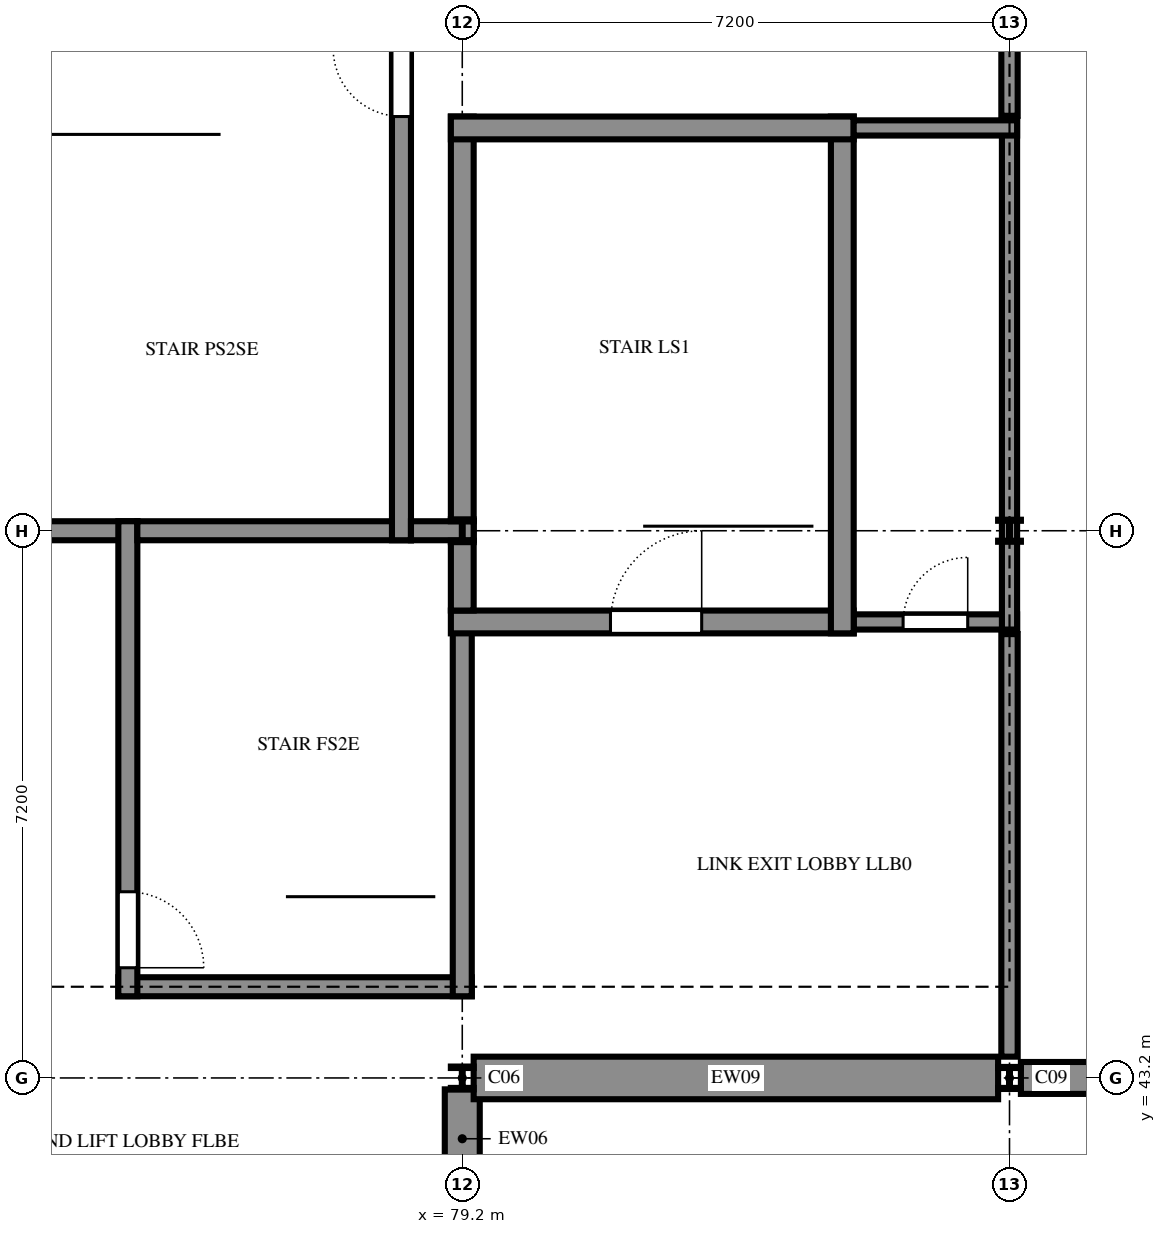
"""IFC4 building model, lengths in metres.
Left out: names, types, materials, properties, quantities, classifications, styles, units other than length and angle.
Written with IfcOpenShell. Run it as: python <this file> out.ifc"""

import sys

from ifc_helpers import new_model, si_unit, direction, frame, frame_2d, origin, origin_2d, place, context, subcontext, project, spatial, rectangle, i_section, extrude, element, fill, save


model = new_model("IFC4")
c1 = context("Model", 3, precision=1e-05, world=origin(), true_north=direction((0.0, 1.0)))
c2 = subcontext(c1, "Body", "Model", "MODEL_VIEW")
j1 = project(units=[si_unit("LENGTHUNIT", "METRE"), si_unit("PLANEANGLEUNIT", "RADIAN")], contexts=[c1])
p1 = place(None, origin())
s1 = spatial("IfcSite", under=j1, at=p1, CompositionType="ELEMENT")
p2 = place(p1, origin())
s2 = spatial("IfcBuilding", under=s1, at=p2, CompositionType="ELEMENT")
p3 = place(p2, frame((0.0, 0.0, 14.4)))
s3 = spatial("IfcBuildingStorey", under=s2, at=p3, CompositionType="ELEMENT", Elevation=14.4)
for number, where, z_axis, x_axis in (
    (1, (79.2, 43.2, 0.0), (0.0, 0.0, 1.0), (1.0, 0.0, 0.0)),
    (2, (79.2, 50.4, 0.0), (0.0, 0.0, 1.0), (1.0, 0.0, 0.0)),
):
    element("IfcColumn", number, at=place(p3, frame(where, z_axis=z_axis, x_axis=x_axis)), inside=s3, PredefinedType="COLUMN", context=c2, shape_type="SweptSolid", body=[
        extrude(i_section(OverallWidth=0.3, OverallDepth=0.3, WebThickness=0.011, FlangeThickness=0.019, FilletRadius=0.027, at=origin_2d()), origin(), (0.0, 0.0, 1.0), 3.6),
    ])
for number, where, z_axis, x_axis in (
    (3, (86.4, 43.2, 0.0), (0.0, 0.0, 1.0), (1.0, 0.0, 0.0)),
    (4, (86.4, 50.4, 0.0), (0.0, 0.0, 1.0), (1.0, 0.0, 0.0)),
):
    element("IfcColumn", number, at=place(p3, frame(where, z_axis=z_axis, x_axis=x_axis)), inside=s3, PredefinedType="COLUMN", context=c2, shape_type="SweptSolid", body=[
        extrude(i_section(OverallWidth=0.3, OverallDepth=0.29, WebThickness=0.009, FlangeThickness=0.014, FilletRadius=0.027, at=origin_2d()), origin(), (0.0, 0.0, 1.0), 3.6),
    ])
p4 = place(p3, frame((74.675, 44.4, 0.0), z_axis=(0.0, 0.0, 1.0), x_axis=(1.0, 0.0, 0.0)))
e5 = element("IfcWall", 5, at=p4, inside=s3, PredefinedType="SHEAR", context=c2, shape_type="SweptSolid", body=[
    extrude(rectangle(XDim=4.65, YDim=0.25, at=frame_2d((2.325, 0.0))), origin(), (0.0, 0.0, 1.0), 3.6),
])
p5 = place(p3, frame((79.2, 44.275, 0.0), z_axis=(0.0, 0.0, 1.0), x_axis=(0.0, 1.0, 0.0)))
e6 = element("IfcWall", 6, at=p5, inside=s3, PredefinedType="SHEAR", context=c2, shape_type="SweptSolid", body=[
    extrude(rectangle(XDim=5.075, YDim=0.25, at=frame_2d((2.538, 0.0))), origin(), (0.0, 0.0, 1.0), 3.6),
])
p6 = place(p3, frame((79.05, 49.2, 0.0), z_axis=(0.0, 0.0, 1.0), x_axis=(1.0, 0.0, 0.0)))
e7 = element("IfcWall", 7, at=p6, inside=s3, PredefinedType="SHEAR", context=c2, shape_type="SweptSolid", body=[
    extrude(rectangle(XDim=5.3, YDim=0.3, at=frame_2d((2.65, 0.0))), origin(), (0.0, 0.0, 1.0), 3.6),
])
p7 = place(p6, frame((2.1, 0.0, 0.0)))
e8 = element("IfcOpeningElement", 8, at=p7, cuts=e7, PredefinedType="OPENING", context=c2, shape_type="SweptSolid", body=[
    extrude(rectangle(XDim=1.2, YDim=2.4, at=frame_2d((0.6, 1.2))), frame((0.0, 0.16, 0.0), z_axis=(0.0, -1.0, 0.0), x_axis=(1.0, 0.0, 0.0)), (0.0, 0.0, 1.0), 0.32),
])
p8 = place(p3, frame((79.2, 49.35, 0.0), z_axis=(0.0, 0.0, 1.0), x_axis=(0.0, 1.0, 0.0)))
e9 = element("IfcWall", 9, at=p8, inside=s3, PredefinedType="SHEAR", context=c2, shape_type="SweptSolid", body=[
    extrude(rectangle(XDim=1.175, YDim=0.3, at=frame_2d((0.587, 0.0))), origin(), (0.0, 0.0, 1.0), 3.6),
])
p9 = place(p3, frame((84.35, 49.2, 0.0), z_axis=(0.0, 0.0, 1.0), x_axis=(1.0, 0.0, 0.0)))
e10 = element("IfcWall", 10, at=p9, inside=s3, PredefinedType="SHEAR", context=c2, shape_type="SweptSolid", body=[
    extrude(rectangle(XDim=2.15, YDim=0.2, at=frame_2d((1.075, 0.0))), origin(), (0.0, 0.0, 1.0), 3.6),
])
p10 = place(p9, frame((0.65, 0.0, 0.0)))
e11 = element("IfcOpeningElement", 11, at=p10, cuts=e10, PredefinedType="OPENING", context=c2, shape_type="SweptSolid", body=[
    extrude(rectangle(XDim=0.85, YDim=2.1, at=frame_2d((0.425, 1.05))), frame((0.0, 0.11, 0.0), z_axis=(0.0, -1.0, 0.0), x_axis=(1.0, 0.0, 0.0)), (0.0, 0.0, 1.0), 0.22),
])
p11 = place(p3, frame((84.2, 49.05, 0.0), z_axis=(0.0, 0.0, 1.0), x_axis=(0.0, 1.0, 0.0)))
e12 = element("IfcWall", 12, at=p11, inside=s3, PredefinedType="SHEAR", context=c2, shape_type="SweptSolid", body=[
    extrude(rectangle(XDim=6.8, YDim=0.3, at=frame_2d((3.4, 0.0))), origin(), (0.0, 0.0, 1.0), 3.6),
])
p12 = place(p3, frame((86.4, 49.1, 0.0), z_axis=(0.0, 0.0, 1.0), x_axis=(0.0, 1.0, 0.0)))
e13 = element("IfcWall", 13, at=p12, inside=s3, PredefinedType="SHEAR", context=c2, shape_type="SweptSolid", body=[
    extrude(rectangle(XDim=6.7, YDim=0.2, at=frame_2d((3.35, 0.0))), origin(), (0.0, 0.0, 1.0), 3.6),
])
p13 = place(p3, frame((73.525, 50.4, 0.0), z_axis=(0.0, 0.0, 1.0), x_axis=(1.0, 0.0, 0.0)))
e14 = element("IfcWall", 14, at=p13, inside=s3, PredefinedType="SHEAR", context=c2, shape_type="SweptSolid", body=[
    extrude(rectangle(XDim=1.4, YDim=0.25, at=frame_2d((0.7, 0.0))), origin(), (0.0, 0.0, 1.0), 3.6),
])
p14 = place(p3, frame((74.8, 50.525, 0.0), z_axis=(0.0, 0.0, 1.0), x_axis=(0.0, -1.0, 0.0)))
e15 = element("IfcWall", 15, at=p14, inside=s3, PredefinedType="SHEAR", context=c2, shape_type="SweptSolid", body=[
    extrude(rectangle(XDim=6.25, YDim=0.25, at=frame_2d((3.125, 0.0))), origin(), (0.0, 0.0, 1.0), 3.6),
])
p15 = place(p14, frame((4.875, 0.0, 0.0)))
e16 = element("IfcOpeningElement", 16, at=p15, cuts=e15, PredefinedType="OPENING", context=c2, shape_type="SweptSolid", body=[
    extrude(rectangle(XDim=1.0, YDim=2.4, at=frame_2d((0.5, 1.2))), frame((0.0, 0.135, 0.0), z_axis=(0.0, -1.0, 0.0), x_axis=(1.0, 0.0, 0.0)), (0.0, 0.0, 1.0), 0.27),
])
p16 = place(p3, frame((78.525, 50.4, 0.0), z_axis=(0.0, 0.0, 1.0), x_axis=(-1.0, 0.0, 0.0)))
e17 = element("IfcWall", 17, at=p16, inside=s3, PredefinedType="SHEAR", context=c2, shape_type="SweptSolid", body=[
    extrude(rectangle(XDim=3.6, YDim=0.25, at=frame_2d((1.8, 0.0))), origin(), (0.0, 0.0, 1.0), 3.6),
])
p17 = place(p3, frame((78.4, 50.275, 0.0), z_axis=(0.0, 0.0, 1.0), x_axis=(0.0, 1.0, 0.0)))
e18 = element("IfcWall", 18, at=p17, inside=s3, PredefinedType="SHEAR", context=c2, shape_type="SweptSolid", body=[
    extrude(rectangle(XDim=6.75, YDim=0.25, at=frame_2d((3.375, 0.0))), origin(), (0.0, 0.0, 1.0), 3.6),
])
p18 = place(p17, frame((5.575, 0.0, 0.0)))
e19 = element("IfcOpeningElement", 19, at=p18, cuts=e18, PredefinedType="OPENING", context=c2, shape_type="SweptSolid", body=[
    extrude(rectangle(XDim=0.9, YDim=2.1, at=frame_2d((0.45, 1.05))), frame((0.0, 0.135, 0.0), z_axis=(0.0, -1.0, 0.0), x_axis=(1.0, 0.0, 0.0)), (0.0, 0.0, 1.0), 0.27),
])
p19 = place(p3, frame((79.35, 50.4, 0.0), z_axis=(0.0, 0.0, 1.0), x_axis=(-1.0, 0.0, 0.0)))
e20 = element("IfcWall", 20, at=p19, inside=s3, PredefinedType="SHEAR", context=c2, shape_type="SweptSolid", body=[
    extrude(rectangle(XDim=0.825, YDim=0.25, at=frame_2d((0.413, 0.0))), origin(), (0.0, 0.0, 1.0), 3.6),
])
p20 = place(p3, frame((79.2, 55.85, 0.0), z_axis=(0.0, 0.0, 1.0), x_axis=(0.0, -1.0, 0.0)))
e21 = element("IfcWall", 21, at=p20, inside=s3, PredefinedType="SHEAR", context=c2, shape_type="SweptSolid", body=[
    extrude(rectangle(XDim=5.325, YDim=0.3, at=frame_2d((2.663, 0.0))), origin(), (0.0, 0.0, 1.0), 3.6),
])
p21 = place(p3, frame((84.35, 55.7, 0.0), z_axis=(0.0, 0.0, 1.0), x_axis=(-1.0, 0.0, 0.0)))
e22 = element("IfcWall", 22, at=p21, inside=s3, PredefinedType="SHEAR", context=c2, shape_type="SweptSolid", body=[
    extrude(rectangle(XDim=5.3, YDim=0.3, at=frame_2d((2.65, 0.0))), origin(), (0.0, 0.0, 1.0), 3.6),
])
p22 = place(p3, frame((86.5, 55.7, 0.0), z_axis=(0.0, 0.0, 1.0), x_axis=(-1.0, 0.0, 0.0)))
e23 = element("IfcWall", 23, at=p22, inside=s3, PredefinedType="SHEAR", context=c2, shape_type="SweptSolid", body=[
    extrude(rectangle(XDim=2.15, YDim=0.2, at=frame_2d((1.075, 0.0))), origin(), (0.0, 0.0, 1.0), 3.6),
])
p23 = place(p3, frame((79.2, 41.75, 0.0), z_axis=(0.0, 0.0, 1.0), x_axis=(0.0, 1.0, 0.0)))
e24 = element("IfcWall", 24, at=p23, inside=s3, PredefinedType="SOLIDWALL", context=c2, shape_type="SweptSolid", body=[
    extrude(rectangle(XDim=1.3, YDim=0.46, at=frame_2d((0.65, 0.0))), origin(), (0.0, 0.0, 1.0), 3.22),
])
p24 = place(p3, frame((86.55, 43.2, 0.0), z_axis=(0.0, 0.0, 1.0), x_axis=(1.0, 0.0, 0.0)))
e25 = element("IfcWall", 25, at=p24, inside=s3, PredefinedType="SOLIDWALL", context=c2, shape_type="SweptSolid", body=[
    extrude(rectangle(XDim=114.9, YDim=0.42, at=frame_2d((57.45, 0.0))), origin(), (0.0, 0.0, 1.0), 3.6),
])
p25 = place(p24, frame((1.65, 0.0, 1.2)))
e26 = element("IfcOpeningElement", 26, at=p25, cuts=e25, PredefinedType="OPENING", context=c2, shape_type="SweptSolid", body=[
    extrude(rectangle(XDim=3.6, YDim=1.2, at=frame_2d((1.8, 0.6))), frame((0.0, 0.22, 0.0), z_axis=(0.0, -1.0, 0.0), x_axis=(1.0, 0.0, 0.0)), (0.0, 0.0, 1.0), 0.44),
])
p26 = place(p24, frame((8.85, 0.0, 1.2)))
e27 = element("IfcOpeningElement", 27, at=p26, cuts=e25, PredefinedType="OPENING", context=c2, shape_type="SweptSolid", body=[
    extrude(rectangle(XDim=3.6, YDim=1.2, at=frame_2d((1.8, 0.6))), frame((0.0, 0.22, 0.0), z_axis=(0.0, -1.0, 0.0), x_axis=(1.0, 0.0, 0.0)), (0.0, 0.0, 1.0), 0.44),
])
p27 = place(p24, frame((16.05, 0.0, 1.2)))
e28 = element("IfcOpeningElement", 28, at=p27, cuts=e25, PredefinedType="OPENING", context=c2, shape_type="SweptSolid", body=[
    extrude(rectangle(XDim=3.6, YDim=1.2, at=frame_2d((1.8, 0.6))), frame((0.0, 0.22, 0.0), z_axis=(0.0, -1.0, 0.0), x_axis=(1.0, 0.0, 0.0)), (0.0, 0.0, 1.0), 0.44),
])
p28 = place(p24, frame((23.25, 0.0, 1.2)))
e29 = element("IfcOpeningElement", 29, at=p28, cuts=e25, PredefinedType="OPENING", context=c2, shape_type="SweptSolid", body=[
    extrude(rectangle(XDim=3.6, YDim=1.2, at=frame_2d((1.8, 0.6))), frame((0.0, 0.22, 0.0), z_axis=(0.0, -1.0, 0.0), x_axis=(1.0, 0.0, 0.0)), (0.0, 0.0, 1.0), 0.44),
])
p29 = place(p24, frame((30.45, 0.0, 1.2)))
e30 = element("IfcOpeningElement", 30, at=p29, cuts=e25, PredefinedType="OPENING", context=c2, shape_type="SweptSolid", body=[
    extrude(rectangle(XDim=3.6, YDim=1.2, at=frame_2d((1.8, 0.6))), frame((0.0, 0.22, 0.0), z_axis=(0.0, -1.0, 0.0), x_axis=(1.0, 0.0, 0.0)), (0.0, 0.0, 1.0), 0.44),
])
p30 = place(p24, frame((37.65, 0.0, 1.2)))
e31 = element("IfcOpeningElement", 31, at=p30, cuts=e25, PredefinedType="OPENING", context=c2, shape_type="SweptSolid", body=[
    extrude(rectangle(XDim=3.6, YDim=1.2, at=frame_2d((1.8, 0.6))), frame((0.0, 0.22, 0.0), z_axis=(0.0, -1.0, 0.0), x_axis=(1.0, 0.0, 0.0)), (0.0, 0.0, 1.0), 0.44),
])
p31 = place(p24, frame((44.85, 0.0, 1.2)))
e32 = element("IfcOpeningElement", 32, at=p31, cuts=e25, PredefinedType="OPENING", context=c2, shape_type="SweptSolid", body=[
    extrude(rectangle(XDim=3.6, YDim=1.2, at=frame_2d((1.8, 0.6))), frame((0.0, 0.22, 0.0), z_axis=(0.0, -1.0, 0.0), x_axis=(1.0, 0.0, 0.0)), (0.0, 0.0, 1.0), 0.44),
])
p32 = place(p24, frame((52.05, 0.0, 1.2)))
e33 = element("IfcOpeningElement", 33, at=p32, cuts=e25, PredefinedType="OPENING", context=c2, shape_type="SweptSolid", body=[
    extrude(rectangle(XDim=3.6, YDim=1.2, at=frame_2d((1.8, 0.6))), frame((0.0, 0.22, 0.0), z_axis=(0.0, -1.0, 0.0), x_axis=(1.0, 0.0, 0.0)), (0.0, 0.0, 1.0), 0.44),
])
p33 = place(p24, frame((59.25, 0.0, 1.2)))
e34 = element("IfcOpeningElement", 34, at=p33, cuts=e25, PredefinedType="OPENING", context=c2, shape_type="SweptSolid", body=[
    extrude(rectangle(XDim=3.6, YDim=1.2, at=frame_2d((1.8, 0.6))), frame((0.0, 0.22, 0.0), z_axis=(0.0, -1.0, 0.0), x_axis=(1.0, 0.0, 0.0)), (0.0, 0.0, 1.0), 0.44),
])
p34 = place(p24, frame((66.45, 0.0, 1.2)))
e35 = element("IfcOpeningElement", 35, at=p34, cuts=e25, PredefinedType="OPENING", context=c2, shape_type="SweptSolid", body=[
    extrude(rectangle(XDim=3.6, YDim=1.2, at=frame_2d((1.8, 0.6))), frame((0.0, 0.22, 0.0), z_axis=(0.0, -1.0, 0.0), x_axis=(1.0, 0.0, 0.0)), (0.0, 0.0, 1.0), 0.44),
])
p35 = place(p24, frame((73.65, 0.0, 1.2)))
e36 = element("IfcOpeningElement", 36, at=p35, cuts=e25, PredefinedType="OPENING", context=c2, shape_type="SweptSolid", body=[
    extrude(rectangle(XDim=3.6, YDim=1.2, at=frame_2d((1.8, 0.6))), frame((0.0, 0.22, 0.0), z_axis=(0.0, -1.0, 0.0), x_axis=(1.0, 0.0, 0.0)), (0.0, 0.0, 1.0), 0.44),
])
p36 = place(p24, frame((80.85, 0.0, 1.2)))
e37 = element("IfcOpeningElement", 37, at=p36, cuts=e25, PredefinedType="OPENING", context=c2, shape_type="SweptSolid", body=[
    extrude(rectangle(XDim=3.6, YDim=1.2, at=frame_2d((1.8, 0.6))), frame((0.0, 0.22, 0.0), z_axis=(0.0, -1.0, 0.0), x_axis=(1.0, 0.0, 0.0)), (0.0, 0.0, 1.0), 0.44),
])
p37 = place(p24, frame((88.05, 0.0, 1.2)))
e38 = element("IfcOpeningElement", 38, at=p37, cuts=e25, PredefinedType="OPENING", context=c2, shape_type="SweptSolid", body=[
    extrude(rectangle(XDim=3.6, YDim=1.2, at=frame_2d((1.8, 0.6))), frame((0.0, 0.22, 0.0), z_axis=(0.0, -1.0, 0.0), x_axis=(1.0, 0.0, 0.0)), (0.0, 0.0, 1.0), 0.44),
])
p38 = place(p24, frame((95.25, 0.0, 1.2)))
e39 = element("IfcOpeningElement", 39, at=p38, cuts=e25, PredefinedType="OPENING", context=c2, shape_type="SweptSolid", body=[
    extrude(rectangle(XDim=3.6, YDim=1.2, at=frame_2d((1.8, 0.6))), frame((0.0, 0.22, 0.0), z_axis=(0.0, -1.0, 0.0), x_axis=(1.0, 0.0, 0.0)), (0.0, 0.0, 1.0), 0.44),
])
p39 = place(p24, frame((102.45, 0.0, 1.2)))
e40 = element("IfcOpeningElement", 40, at=p39, cuts=e25, PredefinedType="OPENING", context=c2, shape_type="SweptSolid", body=[
    extrude(rectangle(XDim=3.6, YDim=1.2, at=frame_2d((1.8, 0.6))), frame((0.0, 0.22, 0.0), z_axis=(0.0, -1.0, 0.0), x_axis=(1.0, 0.0, 0.0)), (0.0, 0.0, 1.0), 0.44),
])
p40 = place(p24, frame((109.65, 0.0, 1.2)))
e41 = element("IfcOpeningElement", 41, at=p40, cuts=e25, PredefinedType="OPENING", context=c2, shape_type="SweptSolid", body=[
    extrude(rectangle(XDim=3.6, YDim=1.2, at=frame_2d((1.8, 0.6))), frame((0.0, 0.22, 0.0), z_axis=(0.0, -1.0, 0.0), x_axis=(1.0, 0.0, 0.0)), (0.0, 0.0, 1.0), 0.44),
])
p41 = place(p3, frame((79.35, 43.2, 0.0), z_axis=(0.0, 0.0, 1.0), x_axis=(1.0, 0.0, 0.0)))
e42 = element("IfcWall", 42, at=p41, inside=s3, PredefinedType="SOLIDWALL", context=c2, shape_type="SweptSolid", body=[
    extrude(rectangle(XDim=6.9, YDim=0.56, at=frame_2d((3.45, 0.0))), origin(), (0.0, 0.0, 1.0), 3.12),
])
p42 = place(p3, frame((86.4, 43.48, 0.0), z_axis=(0.0, 0.0, 1.0), x_axis=(0.0, 1.0, 0.0)))
e43 = element("IfcWall", 43, at=p42, inside=s3, PredefinedType="PARTITIONING", context=c2, shape_type="SweptSolid", body=[
    extrude(rectangle(XDim=5.56, YDim=0.215, at=frame_2d((2.78, 0.0))), origin(), (0.0, 0.0, 1.0), 3.149),
])
p43 = place(p3, frame((86.4, 55.86, 0.0), z_axis=(0.0, 0.0, 1.0), x_axis=(0.0, 1.0, 0.0)))
e44 = element("IfcWall", 44, at=p43, inside=s3, PredefinedType="PARTITIONING", context=c2, shape_type="SweptSolid", body=[
    extrude(rectangle(XDim=1.985, YDim=0.215, at=frame_2d((0.992, 0.0))), origin(), (0.0, 0.0, 1.0), 3.6),
])
p44 = place(p15, origin())
e45 = element("IfcDoor", 45, at=p44, inside=s3, OperationType="SINGLE_SWING_LEFT", PredefinedType="DOOR", context=c2, shape_type="SweptSolid", body=[
    extrude(rectangle(XDim=1.0, YDim=2.4, at=frame_2d((0.5, 1.2))), frame((0.0, 0.025, 0.0), z_axis=(0.0, -1.0, 0.0), x_axis=(1.0, 0.0, 0.0)), (0.0, 0.0, 1.0), 0.05),
])
fill(e16, e45)
p45 = place(p18, origin())
e46 = element("IfcDoor", 46, at=p45, inside=s3, OperationType="SINGLE_SWING_LEFT", PredefinedType="DOOR", context=c2, shape_type="SweptSolid", body=[
    extrude(rectangle(XDim=0.9, YDim=2.1, at=frame_2d((0.45, 1.05))), frame((0.0, 0.025, 0.0), z_axis=(0.0, -1.0, 0.0), x_axis=(1.0, 0.0, 0.0)), (0.0, 0.0, 1.0), 0.05),
])
fill(e19, e46)
p46 = place(p7, origin())
e47 = element("IfcDoor", 47, at=p46, inside=s3, OperationType="SINGLE_SWING_LEFT", PredefinedType="DOOR", context=c2, shape_type="SweptSolid", body=[
    extrude(rectangle(XDim=1.2, YDim=2.4, at=frame_2d((0.6, 1.2))), frame((0.0, 0.025, 0.0), z_axis=(0.0, -1.0, 0.0), x_axis=(1.0, 0.0, 0.0)), (0.0, 0.0, 1.0), 0.05),
])
fill(e8, e47)
p47 = place(p10, origin())
e48 = element("IfcDoor", 48, at=p47, inside=s3, OperationType="SINGLE_SWING_LEFT", PredefinedType="DOOR", context=c2, shape_type="SweptSolid", body=[
    extrude(rectangle(XDim=0.85, YDim=2.1, at=frame_2d((0.425, 1.05))), frame((0.0, 0.025, 0.0), z_axis=(0.0, -1.0, 0.0), x_axis=(1.0, 0.0, 0.0)), (0.0, 0.0, 1.0), 0.05),
])
fill(e11, e48)
save(model, sys.argv[1])
